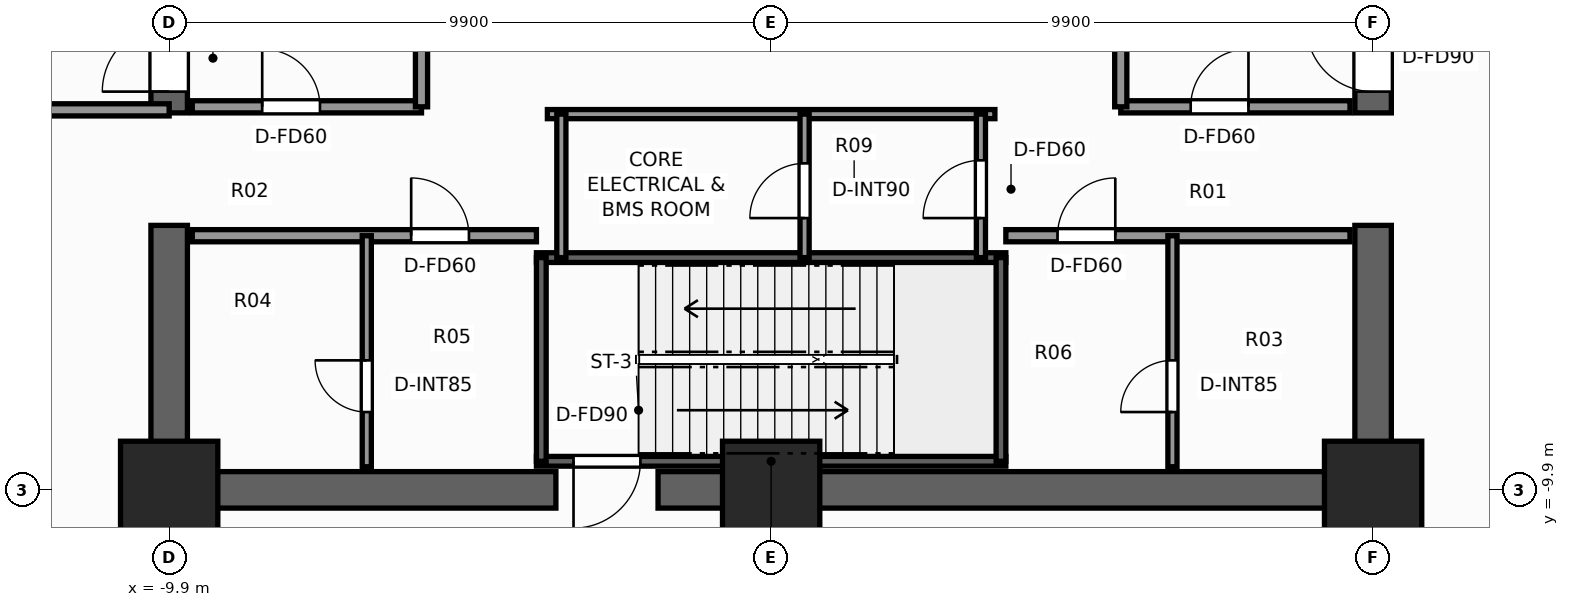
"""IFC4 building model, lengths in metres.
Left out: names, types, materials, properties, quantities, classifications, styles, units other than length and angle.
Written with IfcOpenShell. Run it as: python <this file> out.ifc"""

import sys

from ifc_helpers import new_model, si_unit, direction, frame, frame_2d, origin, origin_2d, place, context, subcontext, project, spatial, rectangle, extrude, element, fill, save


model = new_model("IFC4")
c1 = context("Model", 3, precision=1e-05, world=origin(), true_north=direction((0.0, 1.0)))
c2 = subcontext(c1, "Body", "Model", "MODEL_VIEW")
j1 = project(units=[si_unit("LENGTHUNIT", "METRE"), si_unit("PLANEANGLEUNIT", "RADIAN")], contexts=[c1])
p1 = place(None, origin())
s1 = spatial("IfcSite", under=j1, at=p1, CompositionType="ELEMENT")
p2 = place(p1, origin())
s2 = spatial("IfcBuilding", under=s1, at=p2, CompositionType="ELEMENT")
p3 = place(p2, origin())
s3 = spatial("IfcBuildingStorey", under=s2, at=p3, CompositionType="ELEMENT", Elevation=0.0)
p4 = place(p3, frame((10.2, -9.9, 0.0), z_axis=(0.0, 0.0, 1.0), x_axis=(-1.0, 0.0, 0.0)))
e1 = element("IfcWall", 1, at=p4, inside=s3, PredefinedType="SHEAR", context=c2, shape_type="SweptSolid", body=[
    extrude(rectangle(XDim=12.06, YDim=0.6, at=frame_2d((6.03, 0.0))), origin(), (0.0, 0.0, 1.0), 5.5),
])
p5 = place(p3, frame((-3.54, -9.9, 0.0), z_axis=(0.0, 0.0, 1.0), x_axis=(-1.0, 0.0, 0.0)))
e2 = element("IfcWall", 2, at=p5, inside=s3, PredefinedType="SHEAR", context=c2, shape_type="SweptSolid", body=[
    extrude(rectangle(XDim=6.66, YDim=0.6, at=frame_2d((3.33, 0.0))), origin(), (0.0, 0.0, 1.0), 5.5),
])
for number, where, z_axis, x_axis in (
    (3, (-9.9, -9.6, 0.0), (0.0, 0.0, 1.0), (0.0, 1.0, 0.0)),
    (4, (9.9, -9.6, 0.0), (0.0, 0.0, 1.0), (0.0, 1.0, 0.0)),
):
    element("IfcWall", number, at=place(p3, frame(where, z_axis=z_axis, x_axis=x_axis)), inside=s3, PredefinedType="SHEAR", context=c2, shape_type="SweptSolid", body=[
        extrude(rectangle(XDim=4.05, YDim=0.6, at=frame_2d((2.025, 0.0))), origin(), (0.0, 0.0, 1.0), 5.5),
    ])
p6 = place(p3, frame((-9.9, -3.7, 0.0), z_axis=(0.0, 0.0, 1.0), x_axis=(0.0, 1.0, 0.0)))
e5 = element("IfcWall", 5, at=p6, inside=s3, PredefinedType="SHEAR", context=c2, shape_type="SweptSolid", body=[
    extrude(rectangle(XDim=13.3, YDim=0.6, at=frame_2d((6.65, 0.0))), origin(), (0.0, 0.0, 1.0), 5.5),
])
p7 = place(p6, frame((0.35, 0.0, 0.0)))
e6 = element("IfcOpeningElement", 6, at=p7, cuts=e5, PredefinedType="OPENING", context=c2, shape_type="SweptSolid", body=[
    extrude(rectangle(XDim=1.1, YDim=2.2, at=frame_2d((0.55, 1.1))), frame((0.0, 0.31, 0.0), z_axis=(0.0, -1.0, 0.0), x_axis=(1.0, 0.0, 0.0)), (0.0, 0.0, 1.0), 0.62),
])
p8 = place(p3, frame((9.9, -3.7, 0.0), z_axis=(0.0, 0.0, 1.0), x_axis=(0.0, 1.0, 0.0)))
e7 = element("IfcWall", 7, at=p8, inside=s3, PredefinedType="SHEAR", context=c2, shape_type="SweptSolid", body=[
    extrude(rectangle(XDim=13.3, YDim=0.6, at=frame_2d((6.65, 0.0))), origin(), (0.0, 0.0, 1.0), 5.5),
])
p9 = place(p8, frame((0.35, 0.0, 0.0)))
e8 = element("IfcOpeningElement", 8, at=p9, cuts=e7, PredefinedType="OPENING", context=c2, shape_type="SweptSolid", body=[
    extrude(rectangle(XDim=1.1, YDim=2.2, at=frame_2d((0.55, 1.1))), frame((0.0, 0.31, 0.0), z_axis=(0.0, -1.0, 0.0), x_axis=(1.0, 0.0, 0.0)), (0.0, 0.0, 1.0), 0.62),
])
for number, where, z_axis, x_axis in (
    (9, (-9.9, -9.9, 0.0), (0.0, 0.0, 1.0), (1.0, 0.0, 0.0)),
    (10, (9.9, -9.9, 0.0), (0.0, 0.0, 1.0), (1.0, 0.0, 0.0)),
    (11, (0.0, -9.9, 0.0), (0.0, 0.0, 1.0), (1.0, 0.0, 0.0)),
):
    element("IfcColumn", number, at=place(p3, frame(where, z_axis=z_axis, x_axis=x_axis)), inside=s3, PredefinedType="COLUMN", context=c2, shape_type="SweptSolid", body=[
        extrude(rectangle(XDim=1.6, YDim=1.6, at=origin_2d()), origin(), (0.0, 0.0, 1.0), 5.5),
    ])
p10 = place(p3, frame((3.86, -9.43, 0.0), z_axis=(0.0, 0.0, 1.0), x_axis=(-1.0, 0.0, 0.0)))
e12 = element("IfcWall", 12, at=p10, inside=s3, PredefinedType="SHEAR", context=c2, shape_type="SweptSolid", body=[
    extrude(rectangle(XDim=7.72, YDim=0.16, at=frame_2d((3.86, 0.0))), origin(), (0.0, 0.0, 1.0), 5.5),
])
p11 = place(p10, frame((6.01, 0.0, 0.0)))
e13 = element("IfcOpeningElement", 13, at=p11, cuts=e12, PredefinedType="OPENING", context=c2, shape_type="SweptSolid", body=[
    extrude(rectangle(XDim=1.1, YDim=2.2, at=frame_2d((0.55, 1.1))), frame((0.0, 0.09, 0.0), z_axis=(0.0, -1.0, 0.0), x_axis=(1.0, 0.0, 0.0)), (0.0, 0.0, 1.0), 0.18),
])
p12 = place(p3, frame((-3.86, -6.08, 0.0), z_axis=(0.0, 0.0, 1.0), x_axis=(1.0, 0.0, 0.0)))
e14 = element("IfcWall", 14, at=p12, inside=s3, PredefinedType="SHEAR", context=c2, shape_type="SweptSolid", body=[
    extrude(rectangle(XDim=7.72, YDim=0.16, at=frame_2d((3.86, 0.0))), origin(), (0.0, 0.0, 1.0), 5.5),
])
for number, where, z_axis, x_axis in (
    (15, (-3.78, -9.43, 0.0), (0.0, 0.0, 1.0), (0.0, 1.0, 0.0)),
    (16, (3.78, -9.43, 0.0), (0.0, 0.0, 1.0), (0.0, 1.0, 0.0)),
):
    element("IfcWall", number, at=place(p3, frame(where, z_axis=z_axis, x_axis=x_axis)), inside=s3, PredefinedType="SHEAR", context=c2, shape_type="SweptSolid", body=[
        extrude(rectangle(XDim=3.35, YDim=0.16, at=frame_2d((1.675, 0.0))), origin(), (0.0, 0.0, 1.0), 5.5),
    ])
p13 = place(p3, frame((-9.52, -3.6, 0.0), z_axis=(0.0, 0.0, 1.0), x_axis=(1.0, 0.0, 0.0)))
e17 = element("IfcWall", 17, at=p13, inside=s3, PredefinedType="SOLIDWALL", context=c2, shape_type="SweptSolid", body=[
    extrude(rectangle(XDim=3.77, YDim=0.2, at=frame_2d((1.885, 0.0))), origin(), (0.0, 0.0, 1.0), 5.22),
])
p14 = place(p13, frame((1.15, 0.0, 0.0)))
e18 = element("IfcOpeningElement", 18, at=p14, cuts=e17, PredefinedType="OPENING", context=c2, shape_type="SweptSolid", body=[
    extrude(rectangle(XDim=0.95, YDim=2.06, at=frame_2d((0.475, 1.03))), frame((0.0, 0.11, 0.0), z_axis=(0.0, -1.0, 0.0), x_axis=(1.0, 0.0, 0.0)), (0.0, 0.0, 1.0), 0.22),
])
p15 = place(p3, frame((-5.75, -3.6, 0.0), z_axis=(0.0, 0.0, 1.0), x_axis=(0.0, 1.0, 0.0)))
e19 = element("IfcWall", 19, at=p15, inside=s3, PredefinedType="SOLIDWALL", context=c2, shape_type="SweptSolid", body=[
    extrude(rectangle(XDim=5.57, YDim=0.2, at=frame_2d((2.785, 0.0))), origin(), (0.0, 0.0, 1.0), 5.22),
])
p16 = place(p15, frame((2.75, 0.0, 0.0)))
e20 = element("IfcOpeningElement", 20, at=p16, cuts=e19, PredefinedType="OPENING", context=c2, shape_type="SweptSolid", body=[
    extrude(rectangle(XDim=1.1, YDim=2.2, at=frame_2d((0.55, 1.1))), frame((0.0, 0.11, 0.0), z_axis=(0.0, -1.0, 0.0), x_axis=(1.0, 0.0, 0.0)), (0.0, 0.0, 1.0), 0.22),
])
p17 = place(p3, frame((5.75, -3.6, 0.0), z_axis=(0.0, 0.0, 1.0), x_axis=(1.0, 0.0, 0.0)))
e21 = element("IfcWall", 21, at=p17, inside=s3, PredefinedType="SOLIDWALL", context=c2, shape_type="SweptSolid", body=[
    extrude(rectangle(XDim=3.77, YDim=0.2, at=frame_2d((1.885, 0.0))), origin(), (0.0, 0.0, 1.0), 5.22),
])
p18 = place(p17, frame((1.15, 0.0, 0.0)))
e22 = element("IfcOpeningElement", 22, at=p18, cuts=e21, PredefinedType="OPENING", context=c2, shape_type="SweptSolid", body=[
    extrude(rectangle(XDim=0.95, YDim=2.06, at=frame_2d((0.475, 1.03))), frame((0.0, 0.11, 0.0), z_axis=(0.0, -1.0, 0.0), x_axis=(1.0, 0.0, 0.0)), (0.0, 0.0, 1.0), 0.22),
])
p19 = place(p3, frame((5.75, -3.6, 0.0), z_axis=(0.0, 0.0, 1.0), x_axis=(0.0, 1.0, 0.0)))
e23 = element("IfcWall", 23, at=p19, inside=s3, PredefinedType="SOLIDWALL", context=c2, shape_type="SweptSolid", body=[
    extrude(rectangle(XDim=5.57, YDim=0.2, at=frame_2d((2.785, 0.0))), origin(), (0.0, 0.0, 1.0), 5.22),
])
p20 = place(p19, frame((2.75, 0.0, 0.0)))
e24 = element("IfcOpeningElement", 24, at=p20, cuts=e23, PredefinedType="OPENING", context=c2, shape_type="SweptSolid", body=[
    extrude(rectangle(XDim=1.1, YDim=2.2, at=frame_2d((0.55, 1.1))), frame((0.0, 0.11, 0.0), z_axis=(0.0, -1.0, 0.0), x_axis=(1.0, 0.0, 0.0)), (0.0, 0.0, 1.0), 0.22),
])
p21 = place(p3, frame((-9.52, -5.72, 0.0), z_axis=(0.0, 0.0, 1.0), x_axis=(1.0, 0.0, 0.0)))
e25 = element("IfcWall", 25, at=p21, inside=s3, PredefinedType="SOLIDWALL", context=c2, shape_type="SweptSolid", body=[
    extrude(rectangle(XDim=5.66, YDim=0.2, at=frame_2d((2.83, 0.0))), origin(), (0.0, 0.0, 1.0), 5.22),
])
p22 = place(p21, frame((3.6, 0.0, 0.0)))
e26 = element("IfcOpeningElement", 26, at=p22, cuts=e25, PredefinedType="OPENING", context=c2, shape_type="SweptSolid", body=[
    extrude(rectangle(XDim=0.95, YDim=2.06, at=frame_2d((0.475, 1.03))), frame((0.0, 0.11, 0.0), z_axis=(0.0, -1.0, 0.0), x_axis=(1.0, 0.0, 0.0)), (0.0, 0.0, 1.0), 0.22),
])
p23 = place(p3, frame((-6.65, -9.52, 0.0), z_axis=(0.0, 0.0, 1.0), x_axis=(0.0, 1.0, 0.0)))
e27 = element("IfcWall", 27, at=p23, inside=s3, PredefinedType="PARTITIONING", context=c2, shape_type="SweptSolid", body=[
    extrude(rectangle(XDim=3.8, YDim=0.15, at=frame_2d((1.9, 0.0))), origin(), (0.0, 0.0, 1.0), 5.22),
])
p24 = place(p23, frame((0.9, 0.0, 0.0)))
e28 = element("IfcOpeningElement", 28, at=p24, cuts=e27, PredefinedType="OPENING", context=c2, shape_type="SweptSolid", body=[
    extrude(rectangle(XDim=0.85, YDim=2.03, at=frame_2d((0.425, 1.015))), frame((0.0, 0.085, 0.0), z_axis=(0.0, -1.0, 0.0), x_axis=(1.0, 0.0, 0.0)), (0.0, 0.0, 1.0), 0.17),
])
p25 = place(p3, frame((3.86, -5.72, 0.0), z_axis=(0.0, 0.0, 1.0), x_axis=(1.0, 0.0, 0.0)))
e29 = element("IfcWall", 29, at=p25, inside=s3, PredefinedType="SOLIDWALL", context=c2, shape_type="SweptSolid", body=[
    extrude(rectangle(XDim=5.66, YDim=0.2, at=frame_2d((2.83, 0.0))), origin(), (0.0, 0.0, 1.0), 5.22),
])
p26 = place(p25, frame((0.85, 0.0, 0.0)))
e30 = element("IfcOpeningElement", 30, at=p26, cuts=e29, PredefinedType="OPENING", context=c2, shape_type="SweptSolid", body=[
    extrude(rectangle(XDim=0.95, YDim=2.06, at=frame_2d((0.475, 1.03))), frame((0.0, 0.11, 0.0), z_axis=(0.0, -1.0, 0.0), x_axis=(1.0, 0.0, 0.0)), (0.0, 0.0, 1.0), 0.22),
])
p27 = place(p3, frame((6.6, -9.52, 0.0), z_axis=(0.0, 0.0, 1.0), x_axis=(0.0, 1.0, 0.0)))
e31 = element("IfcWall", 31, at=p27, inside=s3, PredefinedType="PARTITIONING", context=c2, shape_type="SweptSolid", body=[
    extrude(rectangle(XDim=3.8, YDim=0.15, at=frame_2d((1.9, 0.0))), origin(), (0.0, 0.0, 1.0), 5.22),
])
p28 = place(p27, frame((0.9, 0.0, 0.0)))
e32 = element("IfcOpeningElement", 32, at=p28, cuts=e31, PredefinedType="OPENING", context=c2, shape_type="SweptSolid", body=[
    extrude(rectangle(XDim=0.85, YDim=2.03, at=frame_2d((0.425, 1.015))), frame((0.0, 0.085, 0.0), z_axis=(0.0, -1.0, 0.0), x_axis=(1.0, 0.0, 0.0)), (0.0, 0.0, 1.0), 0.17),
])
p29 = place(p3, frame((-3.68, -3.72, 0.0), z_axis=(0.0, 0.0, 1.0), x_axis=(1.0, 0.0, 0.0)))
e33 = element("IfcWall", 33, at=p29, inside=s3, PredefinedType="PARTITIONING", context=c2, shape_type="SweptSolid", body=[
    extrude(rectangle(XDim=7.36, YDim=0.15, at=frame_2d((3.68, 0.0))), origin(), (0.0, 0.0, 1.0), 5.22),
])
p30 = place(p3, frame((3.45, -6.08, 0.0), z_axis=(0.0, 0.0, 1.0), x_axis=(0.0, 1.0, 0.0)))
e34 = element("IfcWall", 34, at=p30, inside=s3, PredefinedType="PARTITIONING", context=c2, shape_type="SweptSolid", body=[
    extrude(rectangle(XDim=2.36, YDim=0.15, at=frame_2d((1.18, 0.0))), origin(), (0.0, 0.0, 1.0), 5.22),
])
p31 = place(p30, frame((0.65, 0.0, 0.0)))
e35 = element("IfcOpeningElement", 35, at=p31, cuts=e34, PredefinedType="OPENING", context=c2, shape_type="SweptSolid", body=[
    extrude(rectangle(XDim=0.95, YDim=2.06, at=frame_2d((0.475, 1.03))), frame((0.0, 0.085, 0.0), z_axis=(0.0, -1.0, 0.0), x_axis=(1.0, 0.0, 0.0)), (0.0, 0.0, 1.0), 0.17),
])
p32 = place(p3, frame((-3.45, -6.08, 0.0), z_axis=(0.0, 0.0, 1.0), x_axis=(0.0, 1.0, 0.0)))
e36 = element("IfcWall", 36, at=p32, inside=s3, PredefinedType="PARTITIONING", context=c2, shape_type="SweptSolid", body=[
    extrude(rectangle(XDim=2.36, YDim=0.15, at=frame_2d((1.18, 0.0))), origin(), (0.0, 0.0, 1.0), 5.22),
])
p33 = place(p3, frame((0.55, -6.08, 0.0), z_axis=(0.0, 0.0, 1.0), x_axis=(0.0, 1.0, 0.0)))
e37 = element("IfcWall", 37, at=p33, inside=s3, PredefinedType="PARTITIONING", context=c2, shape_type="SweptSolid", body=[
    extrude(rectangle(XDim=2.36, YDim=0.15, at=frame_2d((1.18, 0.0))), origin(), (0.0, 0.0, 1.0), 5.22),
])
p34 = place(p33, frame((0.65, 0.0, 0.0)))
e38 = element("IfcOpeningElement", 38, at=p34, cuts=e37, PredefinedType="OPENING", context=c2, shape_type="SweptSolid", body=[
    extrude(rectangle(XDim=0.9, YDim=2.06, at=frame_2d((0.45, 1.03))), frame((0.0, 0.085, 0.0), z_axis=(0.0, -1.0, 0.0), x_axis=(1.0, 0.0, 0.0)), (0.0, 0.0, 1.0), 0.17),
])
p35 = place(p3, frame((-12.72, -3.65, 0.0), z_axis=(0.0, 0.0, 1.0), x_axis=(1.0, 0.0, 0.0)))
e39 = element("IfcWall", 39, at=p35, inside=s3, PredefinedType="SOLIDWALL", context=c2, shape_type="SweptSolid", body=[
    extrude(rectangle(XDim=2.82, YDim=0.2, at=frame_2d((1.41, 0.0))), origin(), (0.0, 0.0, 1.0), 4.255),
])
p36 = place(p11, origin())
e40 = element("IfcDoor", 40, at=p36, inside=s3, OperationType="SINGLE_SWING_RIGHT", PredefinedType="DOOR", context=c2, shape_type="SweptSolid", body=[
    extrude(rectangle(XDim=1.1, YDim=2.2, at=frame_2d((0.55, 1.1))), frame((0.0, 0.025, 0.0), z_axis=(0.0, -1.0, 0.0), x_axis=(1.0, 0.0, 0.0)), (0.0, 0.0, 1.0), 0.05),
])
fill(e13, e40)
p37 = place(p7, origin())
e41 = element("IfcDoor", 41, at=p37, inside=s3, OperationType="SINGLE_SWING_LEFT", PredefinedType="DOOR", context=c2, shape_type="SweptSolid", body=[
    extrude(rectangle(XDim=1.1, YDim=2.2, at=frame_2d((0.55, 1.1))), frame((0.0, 0.025, 0.0), z_axis=(0.0, -1.0, 0.0), x_axis=(1.0, 0.0, 0.0)), (0.0, 0.0, 1.0), 0.05),
])
fill(e6, e41)
p38 = place(p9, origin())
e42 = element("IfcDoor", 42, at=p38, inside=s3, OperationType="SINGLE_SWING_RIGHT", PredefinedType="DOOR", context=c2, shape_type="SweptSolid", body=[
    extrude(rectangle(XDim=1.1, YDim=2.2, at=frame_2d((0.55, 1.1))), frame((0.0, 0.025, 0.0), z_axis=(0.0, -1.0, 0.0), x_axis=(1.0, 0.0, 0.0)), (0.0, 0.0, 1.0), 0.05),
])
fill(e8, e42)
p39 = place(p22, origin())
e43 = element("IfcDoor", 43, at=p39, inside=s3, OperationType="SINGLE_SWING_LEFT", PredefinedType="DOOR", context=c2, shape_type="SweptSolid", body=[
    extrude(rectangle(XDim=0.95, YDim=2.06, at=frame_2d((0.475, 1.03))), frame((0.0, 0.025, 0.0), z_axis=(0.0, -1.0, 0.0), x_axis=(1.0, 0.0, 0.0)), (0.0, 0.0, 1.0), 0.05),
])
fill(e26, e43)
p40 = place(p24, origin())
e44 = element("IfcDoor", 44, at=p40, inside=s3, OperationType="SINGLE_SWING_RIGHT", PredefinedType="DOOR", context=c2, shape_type="SweptSolid", body=[
    extrude(rectangle(XDim=0.85, YDim=2.03, at=frame_2d((0.425, 1.015))), frame((0.0, 0.025, 0.0), z_axis=(0.0, -1.0, 0.0), x_axis=(1.0, 0.0, 0.0)), (0.0, 0.0, 1.0), 0.05),
])
fill(e28, e44)
p41 = place(p14, origin())
e45 = element("IfcDoor", 45, at=p41, inside=s3, OperationType="SINGLE_SWING_LEFT", PredefinedType="DOOR", context=c2, shape_type="SweptSolid", body=[
    extrude(rectangle(XDim=0.95, YDim=2.06, at=frame_2d((0.475, 1.03))), frame((0.0, 0.025, 0.0), z_axis=(0.0, -1.0, 0.0), x_axis=(1.0, 0.0, 0.0)), (0.0, 0.0, 1.0), 0.05),
])
fill(e18, e45)
p42 = place(p26, origin())
e46 = element("IfcDoor", 46, at=p42, inside=s3, OperationType="SINGLE_SWING_RIGHT", PredefinedType="DOOR", context=c2, shape_type="SweptSolid", body=[
    extrude(rectangle(XDim=0.95, YDim=2.06, at=frame_2d((0.475, 1.03))), frame((0.0, 0.025, 0.0), z_axis=(0.0, -1.0, 0.0), x_axis=(1.0, 0.0, 0.0)), (0.0, 0.0, 1.0), 0.05),
])
fill(e30, e46)
p43 = place(p28, origin())
e47 = element("IfcDoor", 47, at=p43, inside=s3, OperationType="SINGLE_SWING_LEFT", PredefinedType="DOOR", context=c2, shape_type="SweptSolid", body=[
    extrude(rectangle(XDim=0.85, YDim=2.03, at=frame_2d((0.425, 1.015))), frame((0.0, 0.025, 0.0), z_axis=(0.0, -1.0, 0.0), x_axis=(1.0, 0.0, 0.0)), (0.0, 0.0, 1.0), 0.05),
])
fill(e32, e47)
p44 = place(p18, origin())
e48 = element("IfcDoor", 48, at=p44, inside=s3, OperationType="SINGLE_SWING_RIGHT", PredefinedType="DOOR", context=c2, shape_type="SweptSolid", body=[
    extrude(rectangle(XDim=0.95, YDim=2.06, at=frame_2d((0.475, 1.03))), frame((0.0, 0.025, 0.0), z_axis=(0.0, -1.0, 0.0), x_axis=(1.0, 0.0, 0.0)), (0.0, 0.0, 1.0), 0.05),
])
fill(e22, e48)
p45 = place(p31, origin())
e49 = element("IfcDoor", 49, at=p45, inside=s3, OperationType="SINGLE_SWING_LEFT", PredefinedType="DOOR", context=c2, shape_type="SweptSolid", body=[
    extrude(rectangle(XDim=0.95, YDim=2.06, at=frame_2d((0.475, 1.03))), frame((0.0, 0.025, 0.0), z_axis=(0.0, -1.0, 0.0), x_axis=(1.0, 0.0, 0.0)), (0.0, 0.0, 1.0), 0.05),
])
fill(e35, e49)
p46 = place(p34, origin())
e50 = element("IfcDoor", 50, at=p46, inside=s3, OperationType="SINGLE_SWING_LEFT", PredefinedType="DOOR", context=c2, shape_type="SweptSolid", body=[
    extrude(rectangle(XDim=0.9, YDim=2.06, at=frame_2d((0.45, 1.03))), frame((0.0, 0.025, 0.0), z_axis=(0.0, -1.0, 0.0), x_axis=(1.0, 0.0, 0.0)), (0.0, 0.0, 1.0), 0.05),
])
fill(e38, e50)
save(model, sys.argv[1])
